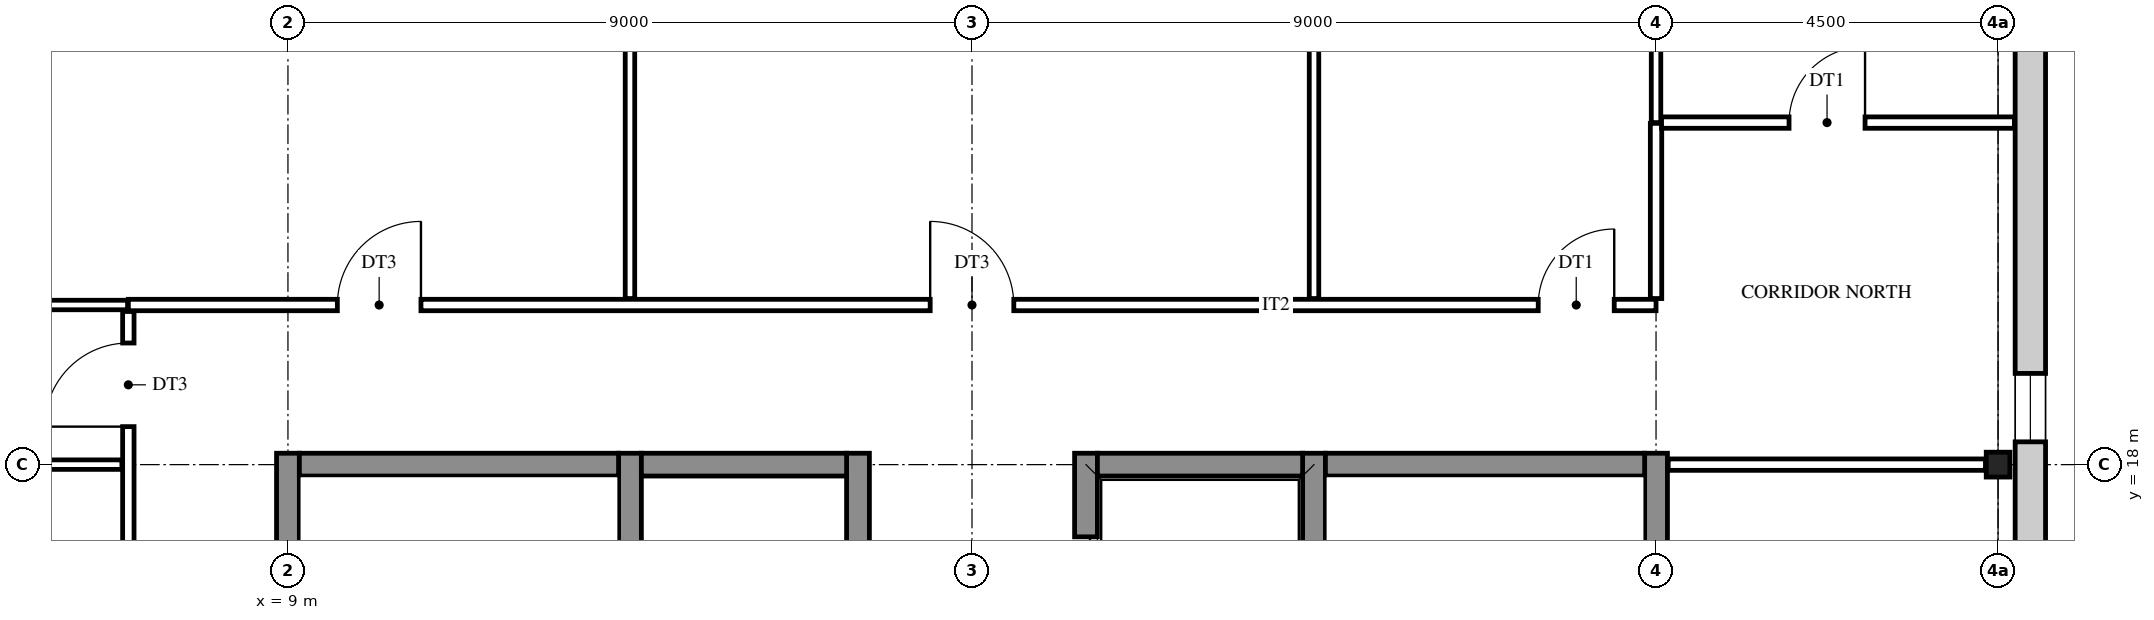
"""IFC4 building model, lengths in metres.
Left out: names, types, materials, properties, quantities, classifications, styles, units other than length and angle.
Written with IfcOpenShell. Run it as: python <this file> out.ifc"""

import sys

from ifc_helpers import new_model, si_unit, direction, frame, frame_2d, origin, origin_2d, place, context, subcontext, project, spatial, rectangle, i_section, extrude, element, fill, save


model = new_model("IFC4")
c1 = context("Model", 3, precision=1e-05, world=origin(), true_north=direction((0.0, 1.0)))
c2 = subcontext(c1, "Body", "Model", "MODEL_VIEW")
j1 = project(units=[si_unit("LENGTHUNIT", "METRE"), si_unit("PLANEANGLEUNIT", "RADIAN")], contexts=[c1])
p1 = place(None, origin())
s1 = spatial("IfcSite", under=j1, at=p1, CompositionType="ELEMENT")
p2 = place(p1, origin())
s2 = spatial("IfcBuilding", under=s1, at=p2, CompositionType="ELEMENT")
p3 = place(p2, frame((0.0, 0.0, 27.6)))
s3 = spatial("IfcBuildingStorey", under=s2, at=p3, CompositionType="ELEMENT", Elevation=27.6)
p4 = place(p3, frame((31.5, 18.0, 0.0), z_axis=(0.0, 0.0, 1.0), x_axis=(1.0, 0.0, 0.0)))
e1 = element("IfcColumn", 1, at=p4, inside=s3, PredefinedType="COLUMN", context=c2, shape_type="SweptSolid", body=[
    extrude(i_section(OverallWidth=0.311, OverallDepth=0.327, WebThickness=0.016, FlangeThickness=0.025, FilletRadius=0.017, at=origin_2d()), origin(), (0.0, 0.0, 1.0), 4.2),
])
for number, where, z_axis, x_axis in (
    (2, (9.0, 8.85, 0.0), (0.0, 0.0, 1.0), (0.0, 1.0, 0.0)),
    (3, (13.5, 8.85, 0.0), (0.0, 0.0, 1.0), (0.0, 1.0, 0.0)),
):
    element("IfcWall", number, at=place(p3, frame(where, z_axis=z_axis, x_axis=x_axis)), inside=s3, PredefinedType="SHEAR", context=c2, shape_type="SweptSolid", body=[
        extrude(rectangle(XDim=9.3, YDim=0.3, at=frame_2d((4.65, 0.0))), origin(), (0.0, 0.0, 1.0), 4.2),
    ])
p5 = place(p3, frame((16.5, 8.85, 0.0), z_axis=(0.0, 0.0, 1.0), x_axis=(0.0, 1.0, 0.0)))
e4 = element("IfcWall", 4, at=p5, inside=s3, PredefinedType="SHEAR", context=c2, shape_type="SweptSolid", body=[
    extrude(rectangle(XDim=9.3, YDim=0.3, at=frame_2d((4.65, 0.0))), origin(), (0.0, 0.0, 1.0), 4.2),
])
p6 = place(p5, frame((1.1, 0.0, 0.0)))
e5 = element("IfcOpeningElement", 5, at=p6, cuts=e4, PredefinedType="OPENING", context=c2, shape_type="SweptSolid", body=[
    extrude(rectangle(XDim=1.1, YDim=2.1, at=frame_2d((0.55, 1.05))), frame((0.0, 0.16, 0.0), z_axis=(0.0, -1.0, 0.0), x_axis=(1.0, 0.0, 0.0)), (0.0, 0.0, 1.0), 0.32),
])
p7 = place(p5, frame((4.1, 0.0, 0.0)))
e6 = element("IfcOpeningElement", 6, at=p7, cuts=e4, PredefinedType="OPENING", context=c2, shape_type="SweptSolid", body=[
    extrude(rectangle(XDim=1.1, YDim=2.1, at=frame_2d((0.55, 1.05))), frame((0.0, 0.16, 0.0), z_axis=(0.0, -1.0, 0.0), x_axis=(1.0, 0.0, 0.0)), (0.0, 0.0, 1.0), 0.32),
])
p8 = place(p3, frame((19.5, 8.85, 0.0), z_axis=(0.0, 0.0, 1.0), x_axis=(0.0, 1.0, 0.0)))
e7 = element("IfcWall", 7, at=p8, inside=s3, PredefinedType="SHEAR", context=c2, shape_type="SweptSolid", body=[
    extrude(rectangle(XDim=9.3, YDim=0.3, at=frame_2d((4.65, 0.0))), origin(), (0.0, 0.0, 1.0), 4.2),
])
p9 = place(p8, frame((3.95, 0.0, 0.0)))
e8 = element("IfcOpeningElement", 8, at=p9, cuts=e7, PredefinedType="OPENING", context=c2, shape_type="SweptSolid", body=[
    extrude(rectangle(XDim=1.4, YDim=2.1, at=frame_2d((0.7, 1.05))), frame((0.0, 0.16, 0.0), z_axis=(0.0, -1.0, 0.0), x_axis=(1.0, 0.0, 0.0)), (0.0, 0.0, 1.0), 0.32),
])
p10 = place(p8, frame((7.1, 0.0, 0.0)))
e9 = element("IfcOpeningElement", 9, at=p10, cuts=e7, PredefinedType="OPENING", context=c2, shape_type="SweptSolid", body=[
    extrude(rectangle(XDim=1.1, YDim=2.1, at=frame_2d((0.55, 1.05))), frame((0.0, 0.16, 0.0), z_axis=(0.0, -1.0, 0.0), x_axis=(1.0, 0.0, 0.0)), (0.0, 0.0, 1.0), 0.32),
])
for number, where, z_axis, x_axis in (
    (10, (22.5, 8.85, 0.0), (0.0, 0.0, 1.0), (0.0, 1.0, 0.0)),
    (11, (27.0, 8.85, 0.0), (0.0, 0.0, 1.0), (0.0, 1.0, 0.0)),
):
    element("IfcWall", number, at=place(p3, frame(where, z_axis=z_axis, x_axis=x_axis)), inside=s3, PredefinedType="SHEAR", context=c2, shape_type="SweptSolid", body=[
        extrude(rectangle(XDim=9.3, YDim=0.3, at=frame_2d((4.65, 0.0))), origin(), (0.0, 0.0, 1.0), 4.2),
    ])
p11 = place(p3, frame((9.15, 18.0, 0.0), z_axis=(0.0, 0.0, 1.0), x_axis=(1.0, 0.0, 0.0)))
e12 = element("IfcWall", 12, at=p11, inside=s3, PredefinedType="SHEAR", context=c2, shape_type="SweptSolid", body=[
    extrude(rectangle(XDim=4.2, YDim=0.3, at=frame_2d((2.1, 0.0))), origin(), (0.0, 0.0, 1.0), 4.2),
])
for number, where, z_axis, x_axis in (
    (13, (13.65, 18.0, 0.0), (0.0, 0.0, 1.0), (1.0, 0.0, 0.0)),
    (14, (19.65, 18.0, 0.0), (0.0, 0.0, 1.0), (1.0, 0.0, 0.0)),
):
    element("IfcWall", number, at=place(p3, frame(where, z_axis=z_axis, x_axis=x_axis)), inside=s3, PredefinedType="SHEAR", context=c2, shape_type="SweptSolid", body=[
        extrude(rectangle(XDim=2.7, YDim=0.3, at=frame_2d((1.35, 0.0))), origin(), (0.0, 0.0, 1.0), 4.2),
    ])
p12 = place(p3, frame((22.65, 18.0, 0.0), z_axis=(0.0, 0.0, 1.0), x_axis=(1.0, 0.0, 0.0)))
e15 = element("IfcWall", 15, at=p12, inside=s3, PredefinedType="SHEAR", context=c2, shape_type="SweptSolid", body=[
    extrude(rectangle(XDim=4.2, YDim=0.3, at=frame_2d((2.1, 0.0))), origin(), (0.0, 0.0, 1.0), 4.2),
])
p13 = place(p3, frame((31.925, 27.225, 0.0), z_axis=(0.0, 0.0, 1.0), x_axis=(0.0, -1.0, 0.0)))
e16 = element("IfcWall", 16, at=p13, inside=s3, PredefinedType="STANDARD", context=c2, shape_type="SweptSolid", body=[
    extrude(rectangle(XDim=27.45, YDim=0.4, at=frame_2d((13.725, 0.0))), origin(), (0.0, 0.0, 1.0), 4.2),
])
p14 = place(p13, frame((26.025, 0.0, 0.9)))
e17 = element("IfcOpeningElement", 17, at=p14, cuts=e16, PredefinedType="OPENING", context=c2, shape_type="SweptSolid", body=[
    extrude(rectangle(XDim=0.9, YDim=2.0, at=frame_2d((0.45, 1.0))), frame((0.0, 0.21, 0.0), z_axis=(0.0, -1.0, 0.0), x_axis=(1.0, 0.0, 0.0)), (0.0, 0.0, 1.0), 0.42),
])
p15 = place(p13, frame((18.525, 0.0, 0.9)))
e18 = element("IfcOpeningElement", 18, at=p15, cuts=e16, PredefinedType="OPENING", context=c2, shape_type="SweptSolid", body=[
    extrude(rectangle(XDim=0.9, YDim=2.0, at=frame_2d((0.45, 1.0))), frame((0.0, 0.21, 0.0), z_axis=(0.0, -1.0, 0.0), x_axis=(1.0, 0.0, 0.0)), (0.0, 0.0, 1.0), 0.42),
])
p16 = place(p13, frame((15.675, 0.0, 1.6)))
e19 = element("IfcOpeningElement", 19, at=p16, cuts=e16, PredefinedType="OPENING", context=c2, shape_type="SweptSolid", body=[
    extrude(rectangle(XDim=0.6, YDim=0.9, at=frame_2d((0.3, 0.45))), frame((0.0, 0.21, 0.0), z_axis=(0.0, -1.0, 0.0), x_axis=(1.0, 0.0, 0.0)), (0.0, 0.0, 1.0), 0.42),
])
p17 = place(p13, frame((11.175, 0.0, 1.6)))
e20 = element("IfcOpeningElement", 20, at=p17, cuts=e16, PredefinedType="OPENING", context=c2, shape_type="SweptSolid", body=[
    extrude(rectangle(XDim=0.6, YDim=0.9, at=frame_2d((0.3, 0.45))), frame((0.0, 0.21, 0.0), z_axis=(0.0, -1.0, 0.0), x_axis=(1.0, 0.0, 0.0)), (0.0, 0.0, 1.0), 0.42),
])
p18 = place(p13, frame((8.025, 0.0, 0.9)))
e21 = element("IfcOpeningElement", 21, at=p18, cuts=e16, PredefinedType="OPENING", context=c2, shape_type="SweptSolid", body=[
    extrude(rectangle(XDim=0.9, YDim=2.0, at=frame_2d((0.45, 1.0))), frame((0.0, 0.21, 0.0), z_axis=(0.0, -1.0, 0.0), x_axis=(1.0, 0.0, 0.0)), (0.0, 0.0, 1.0), 0.42),
])
p19 = place(p13, frame((0.525, 0.0, 0.9)))
e22 = element("IfcOpeningElement", 22, at=p19, cuts=e16, PredefinedType="OPENING", context=c2, shape_type="SweptSolid", body=[
    extrude(rectangle(XDim=0.9, YDim=2.0, at=frame_2d((0.45, 1.0))), frame((0.0, 0.21, 0.0), z_axis=(0.0, -1.0, 0.0), x_axis=(1.0, 0.0, 0.0)), (0.0, 0.0, 1.0), 0.42),
])
p20 = place(p3, frame((6.9, 6.9, 0.0), z_axis=(0.0, 0.0, 1.0), x_axis=(0.0, 1.0, 0.0)))
e23 = element("IfcWall", 23, at=p20, inside=s3, PredefinedType="PARTITIONING", context=c2, shape_type="SweptSolid", body=[
    extrude(rectangle(XDim=13.115, YDim=0.15, at=frame_2d((6.558, 0.0))), origin(), (0.0, 0.0, 1.0), 3.537),
])
p21 = place(p20, frame((11.6, 0.0, 0.0)))
e24 = element("IfcOpeningElement", 24, at=p21, cuts=e23, PredefinedType="OPENING", context=c2, shape_type="SweptSolid", body=[
    extrude(rectangle(XDim=1.1, YDim=2.1, at=frame_2d((0.55, 1.05))), frame((0.0, 0.085, 0.0), z_axis=(0.0, -1.0, 0.0), x_axis=(1.0, 0.0, 0.0)), (0.0, 0.0, 1.0), 0.17),
])
p22 = place(p20, frame((6.05, 0.0, 0.0)))
e25 = element("IfcOpeningElement", 25, at=p22, cuts=e23, PredefinedType="OPENING", context=c2, shape_type="SweptSolid", body=[
    extrude(rectangle(XDim=1.1, YDim=2.1, at=frame_2d((0.55, 1.05))), frame((0.0, 0.085, 0.0), z_axis=(0.0, -1.0, 0.0), x_axis=(1.0, 0.0, 0.0)), (0.0, 0.0, 1.0), 0.17),
])
for number, where, z_axis, x_axis in (
    (26, (13.5, 20.185, 0.0), (0.0, 0.0, 1.0), (0.0, 1.0, 0.0)),
    (27, (22.5, 20.185, 0.0), (0.0, 0.0, 1.0), (0.0, 1.0, 0.0)),
):
    element("IfcWall", number, at=place(p3, frame(where, z_axis=z_axis, x_axis=x_axis)), inside=s3, PredefinedType="PARTITIONING", context=c2, shape_type="SweptSolid", body=[
        extrude(rectangle(XDim=7.041, YDim=0.125, at=frame_2d((3.521, 0.0))), origin(), (0.0, 0.0, 1.0), 3.537),
    ])
p23 = place(p3, frame((27.0, 20.185, 0.0), z_axis=(0.0, 0.0, 1.0), x_axis=(0.0, 1.0, 0.0)))
e28 = element("IfcWall", 28, at=p23, inside=s3, PredefinedType="PARTITIONING", context=c2, shape_type="SweptSolid", body=[
    extrude(rectangle(XDim=2.305, YDim=0.15, at=frame_2d((1.152, 0.0))), origin(), (0.0, 0.0, 1.0), 3.537),
])
p24 = place(p3, frame((27.0, 22.5, 0.0), z_axis=(0.0, 0.0, 1.0), x_axis=(0.0, 1.0, 0.0)))
e29 = element("IfcWall", 29, at=p24, inside=s3, PredefinedType="PARTITIONING", context=c2, shape_type="SweptSolid", body=[
    extrude(rectangle(XDim=4.326, YDim=0.125, at=frame_2d((2.163, 0.0))), origin(), (0.0, 0.0, 1.0), 3.537),
])
p25 = place(p3, frame((0.166, 18.0, 0.0), z_axis=(0.0, 0.0, 1.0), x_axis=(1.0, 0.0, 0.0)))
e30 = element("IfcWall", 30, at=p25, inside=s3, PredefinedType="PARTITIONING", context=c2, shape_type="SweptSolid", body=[
    extrude(rectangle(XDim=6.649, YDim=0.125, at=frame_2d((3.325, 0.0))), origin(), (0.0, 0.0, 1.0), 3.537),
])
p26 = place(p3, frame((27.16, 18.0, 0.0), z_axis=(0.0, 0.0, 1.0), x_axis=(1.0, 0.0, 0.0)))
e31 = element("IfcWall", 31, at=p26, inside=s3, PredefinedType="PARTITIONING", context=c2, shape_type="SweptSolid", body=[
    extrude(rectangle(XDim=4.175, YDim=0.15, at=frame_2d((2.087, 0.0))), origin(), (0.0, 0.0, 1.0), 3.537),
])
p27 = place(p3, frame((4.573, 20.1, 0.0), z_axis=(0.0, 0.0, 1.0), x_axis=(1.0, 0.0, 0.0)))
e32 = element("IfcWall", 32, at=p27, inside=s3, PredefinedType="PARTITIONING", context=c2, shape_type="SweptSolid", body=[
    extrude(rectangle(XDim=2.317, YDim=0.125, at=frame_2d((1.159, 0.0))), origin(), (0.0, 0.0, 1.0), 3.537),
])
p28 = place(p3, frame((6.9, 20.1, 0.0), z_axis=(0.0, 0.0, 1.0), x_axis=(1.0, 0.0, 0.0)))
e33 = element("IfcWall", 33, at=p28, inside=s3, PredefinedType="PARTITIONING", context=c2, shape_type="SweptSolid", body=[
    extrude(rectangle(XDim=20.1, YDim=0.15, at=frame_2d((10.05, 0.0))), origin(), (0.0, 0.0, 1.0), 3.537),
])
p29 = place(p28, frame((2.75, 0.0, 0.0)))
e34 = element("IfcOpeningElement", 34, at=p29, cuts=e33, PredefinedType="OPENING", context=c2, shape_type="SweptSolid", body=[
    extrude(rectangle(XDim=1.1, YDim=2.1, at=frame_2d((0.55, 1.05))), frame((0.0, 0.085, 0.0), z_axis=(0.0, -1.0, 0.0), x_axis=(1.0, 0.0, 0.0)), (0.0, 0.0, 1.0), 0.17),
])
p30 = place(p28, frame((10.55, 0.0, 0.0)))
e35 = element("IfcOpeningElement", 35, at=p30, cuts=e33, PredefinedType="OPENING", context=c2, shape_type="SweptSolid", body=[
    extrude(rectangle(XDim=1.1, YDim=2.1, at=frame_2d((0.55, 1.05))), frame((0.0, 0.085, 0.0), z_axis=(0.0, -1.0, 0.0), x_axis=(1.0, 0.0, 0.0)), (0.0, 0.0, 1.0), 0.17),
])
p31 = place(p28, frame((18.55, 0.0, 0.0)))
e36 = element("IfcOpeningElement", 36, at=p31, cuts=e33, PredefinedType="OPENING", context=c2, shape_type="SweptSolid", body=[
    extrude(rectangle(XDim=1.0, YDim=2.1, at=frame_2d((0.5, 1.05))), frame((0.0, 0.085, 0.0), z_axis=(0.0, -1.0, 0.0), x_axis=(1.0, 0.0, 0.0)), (0.0, 0.0, 1.0), 0.17),
])
p32 = place(p3, frame((27.073, 22.5, 0.0), z_axis=(0.0, 0.0, 1.0), x_axis=(1.0, 0.0, 0.0)))
e37 = element("IfcWall", 37, at=p32, inside=s3, PredefinedType="PARTITIONING", context=c2, shape_type="SweptSolid", body=[
    extrude(rectangle(XDim=4.643, YDim=0.15, at=frame_2d((2.321, 0.0))), origin(), (0.0, 0.0, 1.0), 3.537),
])
p33 = place(p32, frame((1.677, 0.0, 0.0)))
e38 = element("IfcOpeningElement", 38, at=p33, cuts=e37, PredefinedType="OPENING", context=c2, shape_type="SweptSolid", body=[
    extrude(rectangle(XDim=1.0, YDim=2.1, at=frame_2d((0.5, 1.05))), frame((0.0, 0.085, 0.0), z_axis=(0.0, -1.0, 0.0), x_axis=(1.0, 0.0, 0.0)), (0.0, 0.0, 1.0), 0.17),
])
p34 = place(p18, origin())
e39 = element("IfcWindow", 39, at=p34, inside=s3, PartitioningType="SINGLE_PANEL", PredefinedType="WINDOW", context=c2, shape_type="SweptSolid", body=[
    extrude(rectangle(XDim=0.9, YDim=2.0, at=frame_2d((0.45, 1.0))), frame((0.0, 0.03, 0.0), z_axis=(0.0, -1.0, 0.0), x_axis=(1.0, 0.0, 0.0)), (0.0, 0.0, 1.0), 0.06),
])
fill(e21, e39)
p35 = place(p21, origin())
e40 = element("IfcDoor", 40, at=p35, inside=s3, OperationType="SINGLE_SWING_LEFT", PredefinedType="DOOR", context=c2, shape_type="SweptSolid", body=[
    extrude(rectangle(XDim=1.1, YDim=2.1, at=frame_2d((0.55, 1.05))), frame((0.0, 0.025, 0.0), z_axis=(0.0, -1.0, 0.0), x_axis=(1.0, 0.0, 0.0)), (0.0, 0.0, 1.0), 0.05),
])
fill(e24, e40)
p36 = place(p29, origin())
e41 = element("IfcDoor", 41, at=p36, inside=s3, OperationType="SINGLE_SWING_RIGHT", PredefinedType="DOOR", context=c2, shape_type="SweptSolid", body=[
    extrude(rectangle(XDim=1.1, YDim=2.1, at=frame_2d((0.55, 1.05))), frame((0.0, 0.025, 0.0), z_axis=(0.0, -1.0, 0.0), x_axis=(1.0, 0.0, 0.0)), (0.0, 0.0, 1.0), 0.05),
])
fill(e34, e41)
p37 = place(p30, origin())
e42 = element("IfcDoor", 42, at=p37, inside=s3, OperationType="SINGLE_SWING_LEFT", PredefinedType="DOOR", context=c2, shape_type="SweptSolid", body=[
    extrude(rectangle(XDim=1.1, YDim=2.1, at=frame_2d((0.55, 1.05))), frame((0.0, 0.025, 0.0), z_axis=(0.0, -1.0, 0.0), x_axis=(1.0, 0.0, 0.0)), (0.0, 0.0, 1.0), 0.05),
])
fill(e35, e42)
p38 = place(p31, origin())
e43 = element("IfcDoor", 43, at=p38, inside=s3, OperationType="SINGLE_SWING_RIGHT", PredefinedType="DOOR", context=c2, shape_type="SweptSolid", body=[
    extrude(rectangle(XDim=1.0, YDim=2.1, at=frame_2d((0.5, 1.05))), frame((0.0, 0.025, 0.0), z_axis=(0.0, -1.0, 0.0), x_axis=(1.0, 0.0, 0.0)), (0.0, 0.0, 1.0), 0.05),
])
fill(e36, e43)
p39 = place(p33, origin())
e44 = element("IfcDoor", 44, at=p39, inside=s3, OperationType="SINGLE_SWING_RIGHT", PredefinedType="DOOR", context=c2, shape_type="SweptSolid", body=[
    extrude(rectangle(XDim=1.0, YDim=2.1, at=frame_2d((0.5, 1.05))), frame((0.0, 0.025, 0.0), z_axis=(0.0, -1.0, 0.0), x_axis=(1.0, 0.0, 0.0)), (0.0, 0.0, 1.0), 0.05),
])
fill(e38, e44)
p40 = place(p10, origin())
e45 = element("IfcDoor", 45, at=p40, inside=s3, OperationType="DOUBLE_DOOR_SLIDING", PredefinedType="DOOR", context=c2, shape_type="SweptSolid", body=[
    extrude(rectangle(XDim=1.1, YDim=2.1, at=frame_2d((0.55, 1.05))), frame((0.0, 0.025, 0.0), z_axis=(0.0, -1.0, 0.0), x_axis=(1.0, 0.0, 0.0)), (0.0, 0.0, 1.0), 0.05),
])
fill(e9, e45)
save(model, sys.argv[1])
